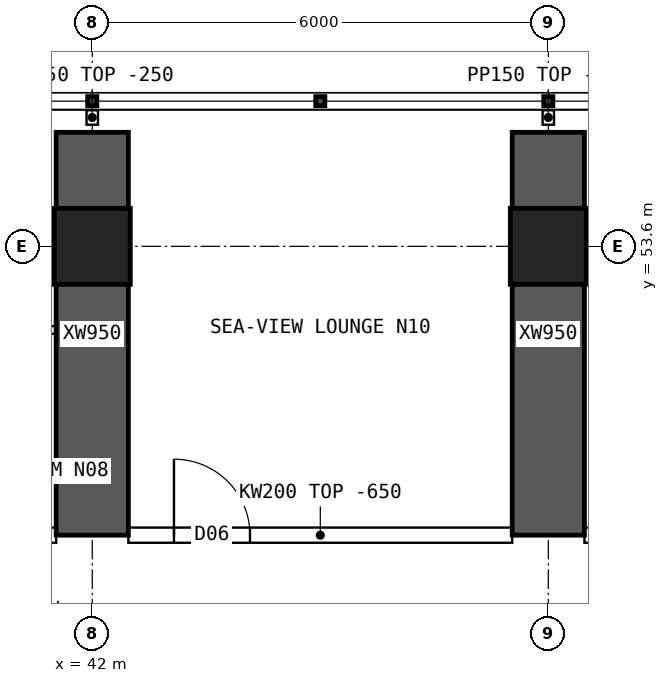
"""IFC4 building model, lengths in metres.
Left out: names, types, materials, properties, quantities, classifications, styles, units other than length and angle.
Written with IfcOpenShell. Run it as: python <this file> out.ifc"""

import sys

from ifc_helpers import new_model, si_unit, direction, frame, frame_2d, origin, origin_2d, place, context, subcontext, project, spatial, polyline, rectangle, hollow_rectangle, outline, extrude, element, fill, save


model = new_model("IFC4")
c1 = context("Model", 3, precision=1e-05, world=origin(), true_north=direction((0.0, 1.0)))
c2 = subcontext(c1, "Body", "Model", "MODEL_VIEW")
j1 = project(units=[si_unit("LENGTHUNIT", "METRE"), si_unit("PLANEANGLEUNIT", "RADIAN")], contexts=[c1])
p1 = place(None, origin())
s1 = spatial("IfcSite", under=j1, at=p1, CompositionType="ELEMENT")
p2 = place(p1, origin())
s2 = spatial("IfcBuilding", under=s1, at=p2, CompositionType="ELEMENT")
p3 = place(p2, frame((0.0, 0.0, 88.15)))
s3 = spatial("IfcBuildingStorey", under=s2, at=p3, CompositionType="ELEMENT", Elevation=88.15)
for number, where, z_axis, x_axis in (
    (1, (42.0, 53.6, 0.0), (0.0, 0.0, 1.0), (1.0, 0.0, 0.0)),
    (2, (48.0, 53.6, 0.0), (0.0, 0.0, 1.0), (1.0, 0.0, 0.0)),
):
    element("IfcColumn", number, at=place(p3, frame(where, z_axis=z_axis, x_axis=x_axis)), inside=s3, PredefinedType="COLUMN", context=c2, shape_type="SweptSolid", body=[
        extrude(hollow_rectangle(XDim=1.0, YDim=1.0, WallThickness=0.1, at=origin_2d()), origin(), (0.0, 0.0, 1.0), 3.75),
    ])
for number, where, z_axis, x_axis in (
    (3, (42.0, 49.8, 0.0), (0.0, 0.0, 1.0), (0.0, 1.0, 0.0)),
    (4, (48.0, 49.8, 0.0), (0.0, 0.0, 1.0), (0.0, 1.0, 0.0)),
):
    element("IfcWall", number, at=place(p3, frame(where, z_axis=z_axis, x_axis=x_axis)), inside=s3, PredefinedType="SHEAR", context=c2, shape_type="SweptSolid", body=[
        extrude(rectangle(XDim=5.3, YDim=0.95, at=frame_2d((2.65, 0.0))), origin(), (0.0, 0.0, 1.0), 3.75),
    ])
p4 = place(p3, frame((36.475, 49.8, 0.0), z_axis=(0.0, 0.0, 1.0), x_axis=(1.0, 0.0, 0.0)))
e5 = element("IfcWall", 5, at=p4, inside=s3, PredefinedType="SOLIDWALL", context=c2, shape_type="SweptSolid", body=[
    extrude(outline(polyline([(0.0, 0.0), (5.05, 0.0), (5.05, 3.1), (0.0, 3.1), (0.0, 0.0)])), frame((0.0, 0.1, 0.0), z_axis=(0.0, -1.0, 0.0), x_axis=(1.0, 0.0, 0.0)), (0.0, 0.0, 1.0), 0.2),
])
p5 = place(p4, frame((0.3, 0.0, 0.0)))
e6 = element("IfcOpeningElement", 6, at=p5, cuts=e5, PredefinedType="OPENING", context=c2, shape_type="SweptSolid", body=[
    extrude(rectangle(XDim=1.0, YDim=2.1, at=frame_2d((0.5, 1.05))), frame((0.0, 0.11, 0.0), z_axis=(0.0, -1.0, 0.0), x_axis=(1.0, 0.0, 0.0)), (0.0, 0.0, 1.0), 0.22),
])
p6 = place(p3, frame((42.475, 49.8, 0.0), z_axis=(0.0, 0.0, 1.0), x_axis=(1.0, 0.0, 0.0)))
e7 = element("IfcWall", 7, at=p6, inside=s3, PredefinedType="SOLIDWALL", context=c2, shape_type="SweptSolid", body=[
    extrude(outline(polyline([(0.0, 0.0), (5.05, 0.0), (5.05, 3.1), (0.0, 3.1), (0.0, 0.0)])), frame((0.0, 0.1, 0.0), z_axis=(0.0, -1.0, 0.0), x_axis=(1.0, 0.0, 0.0)), (0.0, 0.0, 1.0), 0.2),
])
p7 = place(p6, frame((0.6, 0.0, 0.0)))
e8 = element("IfcOpeningElement", 8, at=p7, cuts=e7, PredefinedType="OPENING", context=c2, shape_type="SweptSolid", body=[
    extrude(rectangle(XDim=1.0, YDim=2.1, at=frame_2d((0.5, 1.05))), frame((0.0, 0.11, 0.0), z_axis=(0.0, -1.0, 0.0), x_axis=(1.0, 0.0, 0.0)), (0.0, 0.0, 1.0), 0.22),
])
p8 = place(p3, frame((48.475, 49.8, 0.0), z_axis=(0.0, 0.0, 1.0), x_axis=(1.0, 0.0, 0.0)))
e9 = element("IfcWall", 9, at=p8, inside=s3, PredefinedType="SOLIDWALL", context=c2, shape_type="SweptSolid", body=[
    extrude(outline(polyline([(0.0, 0.0), (5.05, 0.0), (5.05, 3.1), (0.0, 3.1), (0.0, 0.0)])), frame((0.0, 0.1, 0.0), z_axis=(0.0, -1.0, 0.0), x_axis=(1.0, 0.0, 0.0)), (0.0, 0.0, 1.0), 0.2),
])
p9 = place(p8, frame((0.6, 0.0, 0.0)))
e10 = element("IfcOpeningElement", 10, at=p9, cuts=e9, PredefinedType="OPENING", context=c2, shape_type="SweptSolid", body=[
    extrude(rectangle(XDim=1.0, YDim=2.1, at=frame_2d((0.5, 1.05))), frame((0.0, 0.11, 0.0), z_axis=(0.0, -1.0, 0.0), x_axis=(1.0, 0.0, 0.0)), (0.0, 0.0, 1.0), 0.22),
])
p10 = place(p3, frame((38.875, 52.5, 0.0), z_axis=(0.0, 0.0, 1.0), x_axis=(1.0, 0.0, 0.0)))
e11 = element("IfcWall", 11, at=p10, inside=s3, PredefinedType="PARTITIONING", context=c2, shape_type="SweptSolid", body=[
    extrude(rectangle(XDim=2.65, YDim=0.1, at=frame_2d((1.325, 0.0))), origin(), (0.0, 0.0, 1.0), 3.5),
])
for number, where, z_axis, x_axis in (
    (12, (42.0, 55.2, 0.0), (0.0, 0.0, 1.0), (0.0, 1.0, 0.0)),
    (13, (48.0, 55.2, 0.0), (0.0, 0.0, 1.0), (0.0, 1.0, 0.0)),
):
    element("IfcWall", number, at=place(p3, frame(where, z_axis=z_axis, x_axis=x_axis)), inside=s3, PredefinedType="PARTITIONING", context=c2, shape_type="SweptSolid", body=[
        extrude(rectangle(XDim=0.19, YDim=0.15, at=frame_2d((0.095, 0.0))), origin(), (0.0, 0.0, 1.0), 3.5),
    ])
p11 = place(p7, origin())
e14 = element("IfcDoor", 14, at=p11, inside=s3, OperationType="SINGLE_SWING_LEFT", PredefinedType="DOOR", context=c2, shape_type="SweptSolid", body=[
    extrude(rectangle(XDim=1.0, YDim=2.1, at=frame_2d((0.5, 1.05))), frame((0.0, 0.025, 0.0), z_axis=(0.0, -1.0, 0.0), x_axis=(1.0, 0.0, 0.0)), (0.0, 0.0, 1.0), 0.05),
])
fill(e8, e14)
save(model, sys.argv[1])
